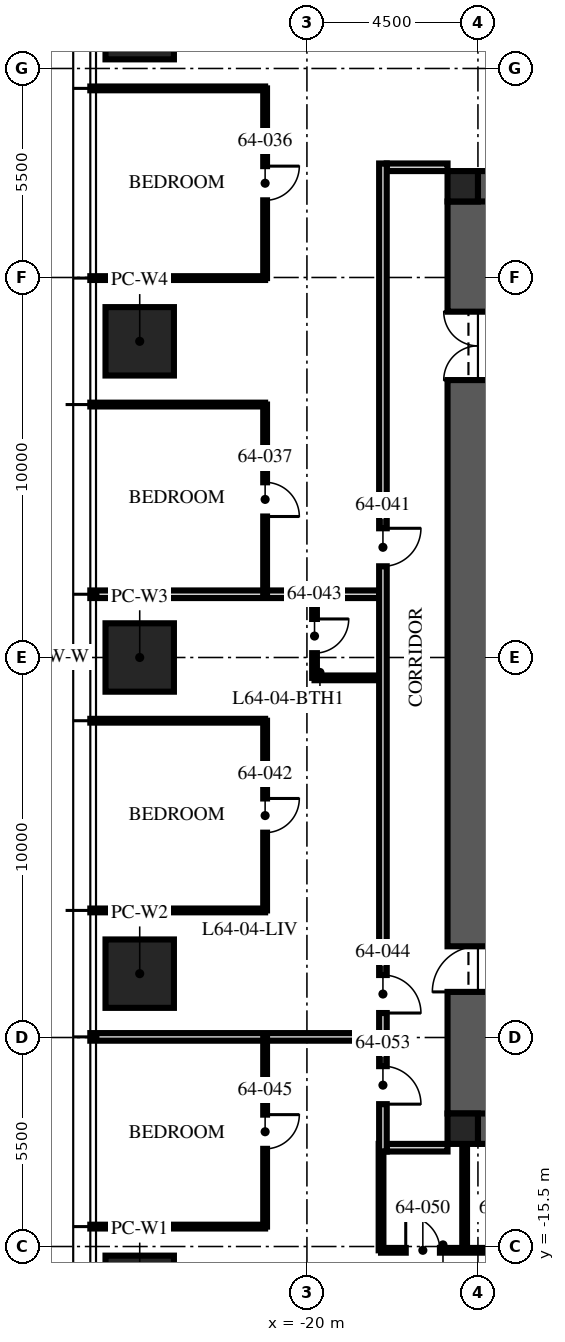
"""IFC4 building model, lengths in metres.
Left out: names, types, materials, properties, quantities, classifications, styles, units other than length and angle.
Written with IfcOpenShell. Run it as: python <this file> out.ifc"""

import sys

from ifc_helpers import new_model, si_unit, direction, frame, frame_2d, origin, origin_2d, place, context, subcontext, project, spatial, rectangle, extrude, element, fill, save


model = new_model("IFC4")
c1 = context("Model", 3, precision=1e-05, world=origin(), true_north=direction((0.0, 1.0)))
c2 = subcontext(c1, "Body", "Model", "MODEL_VIEW")
j1 = project(units=[si_unit("LENGTHUNIT", "METRE"), si_unit("PLANEANGLEUNIT", "RADIAN")], contexts=[c1])
p1 = place(None, origin())
s1 = spatial("IfcSite", under=j1, at=p1, CompositionType="ELEMENT")
p2 = place(p1, origin())
s2 = spatial("IfcBuilding", under=s1, at=p2, CompositionType="ELEMENT")
p3 = place(p2, frame((0.0, 0.0, 255.75)))
s3 = spatial("IfcBuildingStorey", under=s2, at=p3, CompositionType="ELEMENT", Elevation=255.75)
for number, where, z_axis, x_axis in (
    (1, (-15.5, 12.0, -0.25), (0.0, 0.0, 1.0), (1.0, 0.0, 0.0)),
    (2, (-15.5, -12.0, -0.25), (0.0, 0.0, 1.0), (1.0, 0.0, 0.0)),
):
    element("IfcWall", number, at=place(p3, frame(where, z_axis=z_axis, x_axis=x_axis)), inside=s3, PredefinedType="SHEAR", context=c2, shape_type="SweptSolid", body=[
        extrude(rectangle(XDim=31.0, YDim=1.6, at=frame_2d((15.5, 0.0))), origin(), (0.0, 0.0, 1.0), 3.75),
    ])
p4 = place(p3, frame((-15.5, -12.0, -0.25), z_axis=(0.0, 0.0, 1.0), x_axis=(0.0, 1.0, 0.0)))
e3 = element("IfcWall", 3, at=p4, inside=s3, PredefinedType="SHEAR", context=c2, shape_type="SweptSolid", body=[
    extrude(rectangle(XDim=24.0, YDim=1.6, at=frame_2d((12.0, 0.0))), origin(), (0.0, 0.0, 1.0), 3.75),
])
p5 = place(p4, frame((3.2, 0.0, 0.25)))
e4 = element("IfcOpeningElement", 4, at=p5, cuts=e3, PredefinedType="OPENING", context=c2, shape_type="SweptSolid", body=[
    extrude(rectangle(XDim=1.2, YDim=2.1, at=frame_2d((0.6, 1.05))), frame((0.0, 0.81, 0.0), z_axis=(0.0, -1.0, 0.0), x_axis=(1.0, 0.0, 0.0)), (0.0, 0.0, 1.0), 1.62),
])
p6 = place(p4, frame((19.3, 0.0, 0.25)))
e5 = element("IfcOpeningElement", 5, at=p6, cuts=e3, PredefinedType="OPENING", context=c2, shape_type="SweptSolid", body=[
    extrude(rectangle(XDim=1.8, YDim=2.1, at=frame_2d((0.9, 1.05))), frame((0.0, 0.81, 0.0), z_axis=(0.0, -1.0, 0.0), x_axis=(1.0, 0.0, 0.0)), (0.0, 0.0, 1.0), 1.62),
])
for number, where, z_axis, x_axis in (
    (6, (-15.9, 12.4, -0.25), (0.0, 0.0, 1.0), (1.0, 0.0, 0.0)),
    (7, (-15.9, -12.4, -0.25), (0.0, 0.0, 1.0), (1.0, 0.0, 0.0)),
):
    element("IfcColumn", number, at=place(p3, frame(where, z_axis=z_axis, x_axis=x_axis)), inside=s3, PredefinedType="COLUMN", context=c2, shape_type="SweptSolid", body=[
        extrude(rectangle(XDim=0.8, YDim=0.8, at=origin_2d()), origin(), (0.0, 0.0, 1.0), 3.75),
    ])
for number, where, z_axis, x_axis in (
    (8, (-24.4, -16.64, 0.0), (0.0, 0.0, 1.0), (0.0, 1.0, 0.0)),
    (9, (-24.4, -8.32, 0.0), (0.0, 0.0, 1.0), (0.0, 1.0, 0.0)),
    (10, (-24.4, 0.0, 0.0), (0.0, 0.0, 1.0), (0.0, 1.0, 0.0)),
    (11, (-24.4, 8.32, 0.0), (0.0, 0.0, 1.0), (0.0, 1.0, 0.0)),
    (12, (-24.4, 16.64, 0.0), (0.0, 0.0, 1.0), (0.0, 1.0, 0.0)),
):
    element("IfcColumn", number, at=place(p3, frame(where, z_axis=z_axis, x_axis=x_axis)), inside=s3, PredefinedType="COLUMN", context=c2, shape_type="SweptSolid", body=[
        extrude(rectangle(XDim=1.8, YDim=1.8, at=origin_2d()), origin(), (0.0, 0.0, 1.0), 3.75),
    ])
for number, where, z_axis, x_axis in (
    (13, (-16.3, 12.9, 0.0), (0.0, 0.0, 1.0), (-1.0, 0.0, 0.0)),
    (14, (-16.3, -12.9, 0.0), (0.0, 0.0, 1.0), (-1.0, 0.0, 0.0)),
):
    element("IfcWall", number, at=place(p3, frame(where, z_axis=z_axis, x_axis=x_axis)), inside=s3, PredefinedType="PARTITIONING", context=c2, shape_type="SweptSolid", body=[
        extrude(rectangle(XDim=1.6, YDim=0.2, at=frame_2d((0.8, 0.0))), origin(), (0.0, 0.0, 1.0), 2.3),
    ])
for number, where, z_axis, x_axis in (
    (15, (-21.1, 14.976, 0.0), (0.0, 0.0, 1.0), (-1.0, 0.0, 0.0)),
    (16, (-21.1, 9.984, 0.0), (0.0, 0.0, 1.0), (-1.0, 0.0, 0.0)),
    (17, (-21.1, 6.656, 0.0), (0.0, 0.0, 1.0), (-1.0, 0.0, 0.0)),
):
    element("IfcWall", number, at=place(p3, frame(where, z_axis=z_axis, x_axis=x_axis)), inside=s3, PredefinedType="PARTITIONING", context=c2, shape_type="SweptSolid", body=[
        extrude(rectangle(XDim=4.6, YDim=0.1, at=frame_2d((2.3, 0.0))), origin(), (0.0, 0.0, 1.0), 2.91),
    ])
p7 = place(p3, frame((-18.1, 1.664, 0.0), z_axis=(0.0, 0.0, 1.0), x_axis=(-1.0, 0.0, 0.0)))
e18 = element("IfcWall", 18, at=p7, inside=s3, PredefinedType="PARTITIONING", context=c2, shape_type="SweptSolid", body=[
    extrude(rectangle(XDim=7.6, YDim=0.2, at=frame_2d((3.8, 0.0))), origin(), (0.0, 0.0, 1.0), 2.91),
])
for number, where, z_axis, x_axis in (
    (19, (-21.1, -1.664, 0.0), (0.0, 0.0, 1.0), (-1.0, 0.0, 0.0)),
    (20, (-21.1, -6.656, 0.0), (0.0, 0.0, 1.0), (-1.0, 0.0, 0.0)),
):
    element("IfcWall", number, at=place(p3, frame(where, z_axis=z_axis, x_axis=x_axis)), inside=s3, PredefinedType="PARTITIONING", context=c2, shape_type="SweptSolid", body=[
        extrude(rectangle(XDim=4.6, YDim=0.1, at=frame_2d((2.3, 0.0))), origin(), (0.0, 0.0, 1.0), 2.91),
    ])
p8 = place(p3, frame((-18.1, -9.984, 0.0), z_axis=(0.0, 0.0, 1.0), x_axis=(-1.0, 0.0, 0.0)))
e21 = element("IfcWall", 21, at=p8, inside=s3, PredefinedType="PARTITIONING", context=c2, shape_type="SweptSolid", body=[
    extrude(rectangle(XDim=7.6, YDim=0.2, at=frame_2d((3.8, 0.0))), origin(), (0.0, 0.0, 1.0), 2.91),
])
p9 = place(p3, frame((-21.1, -14.976, 0.0), z_axis=(0.0, 0.0, 1.0), x_axis=(-1.0, 0.0, 0.0)))
e22 = element("IfcWall", 22, at=p9, inside=s3, PredefinedType="PARTITIONING", context=c2, shape_type="SweptSolid", body=[
    extrude(rectangle(XDim=4.6, YDim=0.1, at=frame_2d((2.3, 0.0))), origin(), (0.0, 0.0, 1.0), 2.91),
])
p10 = place(p3, frame((-21.1, 14.976, 0.0), z_axis=(0.0, 0.0, 1.0), x_axis=(0.0, -1.0, 0.0)))
e23 = element("IfcWall", 23, at=p10, inside=s3, PredefinedType="PARTITIONING", context=c2, shape_type="SweptSolid", body=[
    extrude(rectangle(XDim=4.992, YDim=0.1, at=frame_2d((2.496, 0.0))), origin(), (0.0, 0.0, 1.0), 2.81),
])
p11 = place(p10, frame((2.046, 0.0, 0.0)))
e24 = element("IfcOpeningElement", 24, at=p11, cuts=e23, PredefinedType="OPENING", context=c2, shape_type="SweptSolid", body=[
    extrude(rectangle(XDim=0.9, YDim=2.1, at=frame_2d((0.45, 1.05))), frame((0.0, 0.06, 0.0), z_axis=(0.0, -1.0, 0.0), x_axis=(1.0, 0.0, 0.0)), (0.0, 0.0, 1.0), 0.12),
])
p12 = place(p3, frame((-21.1, 6.656, 0.0), z_axis=(0.0, 0.0, 1.0), x_axis=(0.0, -1.0, 0.0)))
e25 = element("IfcWall", 25, at=p12, inside=s3, PredefinedType="PARTITIONING", context=c2, shape_type="SweptSolid", body=[
    extrude(rectangle(XDim=4.992, YDim=0.1, at=frame_2d((2.496, 0.0))), origin(), (0.0, 0.0, 1.0), 2.81),
])
p13 = place(p12, frame((2.046, 0.0, 0.0)))
e26 = element("IfcOpeningElement", 26, at=p13, cuts=e25, PredefinedType="OPENING", context=c2, shape_type="SweptSolid", body=[
    extrude(rectangle(XDim=0.9, YDim=2.1, at=frame_2d((0.45, 1.05))), frame((0.0, 0.06, 0.0), z_axis=(0.0, -1.0, 0.0), x_axis=(1.0, 0.0, 0.0)), (0.0, 0.0, 1.0), 0.12),
])
p14 = place(p3, frame((-21.1, -1.664, 0.0), z_axis=(0.0, 0.0, 1.0), x_axis=(0.0, -1.0, 0.0)))
e27 = element("IfcWall", 27, at=p14, inside=s3, PredefinedType="PARTITIONING", context=c2, shape_type="SweptSolid", body=[
    extrude(rectangle(XDim=4.992, YDim=0.1, at=frame_2d((2.496, 0.0))), origin(), (0.0, 0.0, 1.0), 2.81),
])
p15 = place(p14, frame((2.046, 0.0, 0.0)))
e28 = element("IfcOpeningElement", 28, at=p15, cuts=e27, PredefinedType="OPENING", context=c2, shape_type="SweptSolid", body=[
    extrude(rectangle(XDim=0.9, YDim=2.1, at=frame_2d((0.45, 1.05))), frame((0.0, 0.06, 0.0), z_axis=(0.0, -1.0, 0.0), x_axis=(1.0, 0.0, 0.0)), (0.0, 0.0, 1.0), 0.12),
])
p16 = place(p3, frame((-19.8, 1.664, 0.0), z_axis=(0.0, 0.0, 1.0), x_axis=(0.0, -1.0, 0.0)))
e29 = element("IfcWall", 29, at=p16, inside=s3, PredefinedType="PARTITIONING", context=c2, shape_type="SweptSolid", body=[
    extrude(rectangle(XDim=2.2, YDim=0.125, at=frame_2d((1.1, 0.0))), origin(), (0.0, 0.0, 1.0), 2.6),
])
p17 = place(p16, frame((0.65, 0.0, 0.0)))
e30 = element("IfcOpeningElement", 30, at=p17, cuts=e29, PredefinedType="OPENING", context=c2, shape_type="SweptSolid", body=[
    extrude(rectangle(XDim=0.9, YDim=2.1, at=frame_2d((0.45, 1.05))), frame((0.0, 0.073, 0.0), z_axis=(0.0, -1.0, 0.0), x_axis=(1.0, 0.0, 0.0)), (0.0, 0.0, 1.0), 0.145),
])
p18 = place(p3, frame((-18.1, -0.536, 0.0), z_axis=(0.0, 0.0, 1.0), x_axis=(-1.0, 0.0, 0.0)))
e31 = element("IfcWall", 31, at=p18, inside=s3, PredefinedType="PARTITIONING", context=c2, shape_type="SweptSolid", body=[
    extrude(rectangle(XDim=1.7, YDim=0.125, at=frame_2d((0.85, 0.0))), origin(), (0.0, 0.0, 1.0), 3.5),
])
p19 = place(p3, frame((-21.1, -9.984, 0.0), z_axis=(0.0, 0.0, 1.0), x_axis=(0.0, -1.0, 0.0)))
e32 = element("IfcWall", 32, at=p19, inside=s3, PredefinedType="PARTITIONING", context=c2, shape_type="SweptSolid", body=[
    extrude(rectangle(XDim=4.992, YDim=0.1, at=frame_2d((2.496, 0.0))), origin(), (0.0, 0.0, 1.0), 2.81),
])
p20 = place(p19, frame((2.046, 0.0, 0.0)))
e33 = element("IfcOpeningElement", 33, at=p20, cuts=e32, PredefinedType="OPENING", context=c2, shape_type="SweptSolid", body=[
    extrude(rectangle(XDim=0.9, YDim=2.1, at=frame_2d((0.45, 1.05))), frame((0.0, 0.06, 0.0), z_axis=(0.0, -1.0, 0.0), x_axis=(1.0, 0.0, 0.0)), (0.0, 0.0, 1.0), 0.12),
])
p21 = place(p3, frame((-18.05, -15.6, 0.0), z_axis=(0.0, 0.0, 1.0), x_axis=(1.0, 0.0, 0.0)))
e34 = element("IfcWall", 34, at=p21, inside=s3, PredefinedType="PARTITIONING", context=c2, shape_type="SweptSolid", body=[
    extrude(rectangle(XDim=5.9, YDim=0.125, at=frame_2d((2.95, 0.0))), origin(), (0.0, 0.0, 1.0), 2.3),
])
p22 = place(p21, frame((0.65, 0.0, 0.0)))
e35 = element("IfcOpeningElement", 35, at=p22, cuts=e34, PredefinedType="OPENING", context=c2, shape_type="SweptSolid", body=[
    extrude(rectangle(XDim=0.9, YDim=2.1, at=frame_2d((0.45, 1.05))), frame((0.0, 0.073, 0.0), z_axis=(0.0, -1.0, 0.0), x_axis=(1.0, 0.0, 0.0)), (0.0, 0.0, 1.0), 0.145),
])
p23 = place(p21, frame((2.85, 0.0, 0.0)))
e36 = element("IfcOpeningElement", 36, at=p23, cuts=e34, PredefinedType="OPENING", context=c2, shape_type="SweptSolid", body=[
    extrude(rectangle(XDim=0.9, YDim=2.1, at=frame_2d((0.45, 1.05))), frame((0.0, 0.073, 0.0), z_axis=(0.0, -1.0, 0.0), x_axis=(1.0, 0.0, 0.0)), (0.0, 0.0, 1.0), 0.145),
])
p24 = place(p21, frame((4.7, 0.0, 0.0)))
e37 = element("IfcOpeningElement", 37, at=p24, cuts=e34, PredefinedType="OPENING", context=c2, shape_type="SweptSolid", body=[
    extrude(rectangle(XDim=0.9, YDim=2.1, at=frame_2d((0.45, 1.05))), frame((0.0, 0.073, 0.0), z_axis=(0.0, -1.0, 0.0), x_axis=(1.0, 0.0, 0.0)), (0.0, 0.0, 1.0), 0.145),
])
for number, where, z_axis, x_axis in (
    (38, (-18.05, -12.8, 0.0), (0.0, 0.0, 1.0), (0.0, -1.0, 0.0)),
    (39, (-15.85, -12.8, 0.0), (0.0, 0.0, 1.0), (0.0, -1.0, 0.0)),
):
    element("IfcWall", number, at=place(p3, frame(where, z_axis=z_axis, x_axis=x_axis)), inside=s3, PredefinedType="PARTITIONING", context=c2, shape_type="SweptSolid", body=[
        extrude(rectangle(XDim=2.8, YDim=0.125, at=frame_2d((1.4, 0.0))), origin(), (0.0, 0.0, 1.0), 2.3),
    ])
p25 = place(p3, frame((-18.0, 13.0, 0.0), z_axis=(0.0, 0.0, 1.0), x_axis=(0.0, -1.0, 0.0)))
e40 = element("IfcWall", 40, at=p25, inside=s3, PredefinedType="PARTITIONING", context=c2, shape_type="SweptSolid", body=[
    extrude(rectangle(XDim=26.0, YDim=0.2, at=frame_2d((13.0, 0.0))), origin(), (0.0, 0.0, 1.0), 2.6),
])
p26 = place(p25, frame((9.6, 0.0, 0.0)))
e41 = element("IfcOpeningElement", 41, at=p26, cuts=e40, PredefinedType="OPENING", context=c2, shape_type="SweptSolid", body=[
    extrude(rectangle(XDim=1.0, YDim=2.2, at=frame_2d((0.5, 1.1))), frame((0.0, 0.11, 0.0), z_axis=(0.0, -1.0, 0.0), x_axis=(1.0, 0.0, 0.0)), (0.0, 0.0, 1.0), 0.22),
])
p27 = place(p25, frame((21.356, 0.0, 0.0)))
e42 = element("IfcOpeningElement", 42, at=p27, cuts=e40, PredefinedType="OPENING", context=c2, shape_type="SweptSolid", body=[
    extrude(rectangle(XDim=1.0, YDim=2.2, at=frame_2d((0.5, 1.1))), frame((0.0, 0.11, 0.0), z_axis=(0.0, -1.0, 0.0), x_axis=(1.0, 0.0, 0.0)), (0.0, 0.0, 1.0), 0.22),
])
p28 = place(p25, frame((23.754, 0.0, 0.0)))
e43 = element("IfcOpeningElement", 43, at=p28, cuts=e40, PredefinedType="OPENING", context=c2, shape_type="SweptSolid", body=[
    extrude(rectangle(XDim=1.0, YDim=2.2, at=frame_2d((0.5, 1.1))), frame((0.0, 0.11, 0.0), z_axis=(0.0, -1.0, 0.0), x_axis=(1.0, 0.0, 0.0)), (0.0, 0.0, 1.0), 0.22),
])
p29 = place(p5, origin())
e44 = element("IfcDoor", 44, at=p29, inside=s3, OperationType="SINGLE_SWING_LEFT", PredefinedType="DOOR", context=c2, shape_type="SweptSolid", body=[
    extrude(rectangle(XDim=1.2, YDim=2.1, at=frame_2d((0.6, 1.05))), frame((0.0, 0.025, 0.0), z_axis=(0.0, -1.0, 0.0), x_axis=(1.0, 0.0, 0.0)), (0.0, 0.0, 1.0), 0.05),
])
fill(e4, e44)
p30 = place(p6, origin())
e45 = element("IfcDoor", 45, at=p30, inside=s3, OperationType="DOUBLE_DOOR_SINGLE_SWING", PredefinedType="DOOR", context=c2, shape_type="SweptSolid", body=[
    extrude(rectangle(XDim=1.8, YDim=2.1, at=frame_2d((0.9, 1.05))), frame((0.0, 0.025, 0.0), z_axis=(0.0, -1.0, 0.0), x_axis=(1.0, 0.0, 0.0)), (0.0, 0.0, 1.0), 0.05),
])
fill(e5, e45)
p31 = place(p11, origin())
e46 = element("IfcDoor", 46, at=p31, inside=s3, OperationType="SINGLE_SWING_LEFT", PredefinedType="DOOR", context=c2, shape_type="SweptSolid", body=[
    extrude(rectangle(XDim=0.9, YDim=2.1, at=frame_2d((0.45, 1.05))), frame((0.0, 0.025, 0.0), z_axis=(0.0, -1.0, 0.0), x_axis=(1.0, 0.0, 0.0)), (0.0, 0.0, 1.0), 0.05),
])
fill(e24, e46)
p32 = place(p13, origin())
e47 = element("IfcDoor", 47, at=p32, inside=s3, OperationType="SINGLE_SWING_RIGHT", PredefinedType="DOOR", context=c2, shape_type="SweptSolid", body=[
    extrude(rectangle(XDim=0.9, YDim=2.1, at=frame_2d((0.45, 1.05))), frame((0.0, 0.025, 0.0), z_axis=(0.0, -1.0, 0.0), x_axis=(1.0, 0.0, 0.0)), (0.0, 0.0, 1.0), 0.05),
])
fill(e26, e47)
p33 = place(p26, origin())
e48 = element("IfcDoor", 48, at=p33, inside=s3, OperationType="SINGLE_SWING_LEFT", PredefinedType="DOOR", context=c2, shape_type="SweptSolid", body=[
    extrude(rectangle(XDim=1.0, YDim=2.2, at=frame_2d((0.5, 1.1))), frame((0.0, 0.025, 0.0), z_axis=(0.0, -1.0, 0.0), x_axis=(1.0, 0.0, 0.0)), (0.0, 0.0, 1.0), 0.05),
])
fill(e41, e48)
p34 = place(p15, origin())
e49 = element("IfcDoor", 49, at=p34, inside=s3, OperationType="SINGLE_SWING_LEFT", PredefinedType="DOOR", context=c2, shape_type="SweptSolid", body=[
    extrude(rectangle(XDim=0.9, YDim=2.1, at=frame_2d((0.45, 1.05))), frame((0.0, 0.025, 0.0), z_axis=(0.0, -1.0, 0.0), x_axis=(1.0, 0.0, 0.0)), (0.0, 0.0, 1.0), 0.05),
])
fill(e28, e49)
p35 = place(p17, origin())
e50 = element("IfcDoor", 50, at=p35, inside=s3, OperationType="SINGLE_SWING_LEFT", PredefinedType="DOOR", context=c2, shape_type="SweptSolid", body=[
    extrude(rectangle(XDim=0.9, YDim=2.1, at=frame_2d((0.45, 1.05))), frame((0.0, 0.025, 0.0), z_axis=(0.0, -1.0, 0.0), x_axis=(1.0, 0.0, 0.0)), (0.0, 0.0, 1.0), 0.05),
])
fill(e30, e50)
p36 = place(p27, origin())
e51 = element("IfcDoor", 51, at=p36, inside=s3, OperationType="SINGLE_SWING_RIGHT", PredefinedType="DOOR", context=c2, shape_type="SweptSolid", body=[
    extrude(rectangle(XDim=1.0, YDim=2.2, at=frame_2d((0.5, 1.1))), frame((0.0, 0.025, 0.0), z_axis=(0.0, -1.0, 0.0), x_axis=(1.0, 0.0, 0.0)), (0.0, 0.0, 1.0), 0.05),
])
fill(e42, e51)
p37 = place(p20, origin())
e52 = element("IfcDoor", 52, at=p37, inside=s3, OperationType="SINGLE_SWING_LEFT", PredefinedType="DOOR", context=c2, shape_type="SweptSolid", body=[
    extrude(rectangle(XDim=0.9, YDim=2.1, at=frame_2d((0.45, 1.05))), frame((0.0, 0.025, 0.0), z_axis=(0.0, -1.0, 0.0), x_axis=(1.0, 0.0, 0.0)), (0.0, 0.0, 1.0), 0.05),
])
fill(e33, e52)
p38 = place(p22, origin())
e53 = element("IfcDoor", 53, at=p38, inside=s3, OperationType="SINGLE_SWING_LEFT", PredefinedType="DOOR", context=c2, shape_type="SweptSolid", body=[
    extrude(rectangle(XDim=0.9, YDim=2.1, at=frame_2d((0.45, 1.05))), frame((0.0, 0.025, 0.0), z_axis=(0.0, -1.0, 0.0), x_axis=(1.0, 0.0, 0.0)), (0.0, 0.0, 1.0), 0.05),
])
fill(e35, e53)
p39 = place(p28, origin())
e54 = element("IfcDoor", 54, at=p39, inside=s3, OperationType="SINGLE_SWING_RIGHT", PredefinedType="DOOR", context=c2, shape_type="SweptSolid", body=[
    extrude(rectangle(XDim=1.0, YDim=2.2, at=frame_2d((0.5, 1.1))), frame((0.0, 0.025, 0.0), z_axis=(0.0, -1.0, 0.0), x_axis=(1.0, 0.0, 0.0)), (0.0, 0.0, 1.0), 0.05),
])
fill(e43, e54)
save(model, sys.argv[1])
